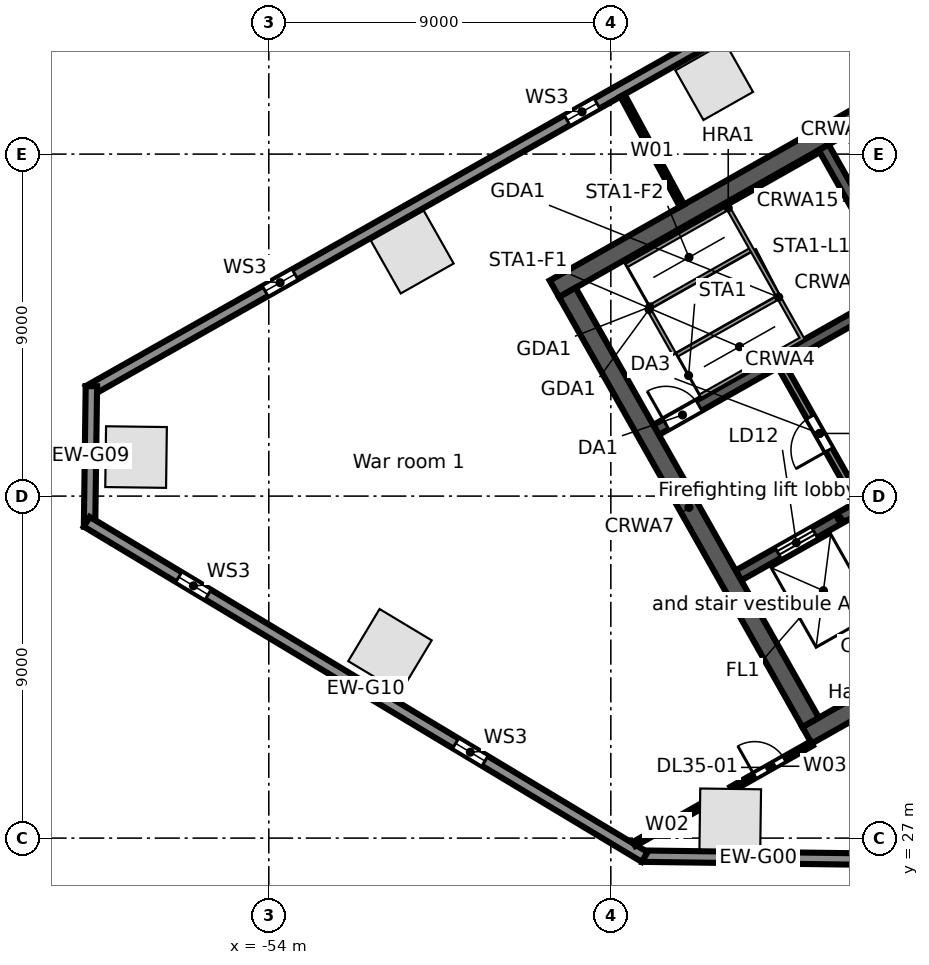
"""IFC4 building model, lengths in metres.
Left out: names, types, materials, properties, quantities, classifications, styles, units other than length and angle.
Written with IfcOpenShell. Run it as: python <this file> out.ifc"""

import sys

from ifc_helpers import new_model, si_unit, direction, frame, frame_2d, origin, origin_2d, place, context, subcontext, project, spatial, rectangle, extrude, element, fill, save


model = new_model("IFC4")
c1 = context("Model", 3, precision=1e-05, world=origin(), true_north=direction((0.0, 1.0)))
c2 = subcontext(c1, "Body", "Model", "MODEL_VIEW")
j1 = project(units=[si_unit("LENGTHUNIT", "METRE"), si_unit("PLANEANGLEUNIT", "RADIAN")], contexts=[c1])
p1 = place(None, origin())
s1 = spatial("IfcSite", under=j1, at=p1, CompositionType="ELEMENT")
p2 = place(p1, origin())
s2 = spatial("IfcBuilding", under=s1, at=p2, CompositionType="ELEMENT")
p3 = place(p2, frame((0.0, 0.0, 174.9)))
s3 = spatial("IfcBuildingStorey", under=s2, at=p3, CompositionType="ELEMENT", Elevation=174.9)
p4 = place(p3, frame((-42.28, 46.919, 0.0), z_axis=(0.0, 0.0, 1.0), x_axis=(-0.87035569594, -0.492423560103, 0.0)))
e1 = element("IfcColumn", 1, at=p4, inside=s3, PredefinedType="COLUMN", context=c2, shape_type="SweptSolid", body=[
    extrude(rectangle(XDim=1.5, YDim=1.5, at=origin_2d()), origin(), (0.0, 0.0, 1.0), 4.0),
])
for number, where, z_axis, x_axis in (
    (2, (-50.226, 42.423, 0.0), (0.0, 0.0, 1.0), (-0.87, -0.492, 0.0)),
    (3, (-57.493, 37.027, 0.0), (0.0, 0.0, 1.0), (-0.013, -1.0, 0.0)),
    (4, (-50.812, 31.931, 0.0), (0.0, 0.0, 1.0), (0.857, -0.515, 0.0)),
    (5, (-41.858, 27.495, 0.0), (0.0, 0.0, 1.0), (1.0, -0.013, 0.0)),
):
    element("IfcColumn", number, at=place(p3, frame(where, z_axis=z_axis, x_axis=x_axis)), inside=s3, PredefinedType="COLUMN", context=c2, shape_type="SweptSolid", body=[
        extrude(rectangle(XDim=1.6, YDim=1.6, at=origin_2d()), origin(), (0.0, 0.0, 1.0), 4.0),
    ])
p5 = place(p3, frame((-38.057, 26.445, 0.0), z_axis=(0.0, 0.0, 1.0), x_axis=(-0.999914086342, 0.013108010296, 0.0)))
e6 = element("IfcWall", 6, at=p5, inside=s3, PredefinedType="STANDARD", context=c2, shape_type="SweptSolid", body=[
    extrude(rectangle(XDim=6.128, YDim=0.3, at=frame_2d((3.064, 0.0))), origin(), (0.0, 0.0, 1.0), 3.68),
])
p6 = place(p3, frame((-58.745, 38.764, 0.0), z_axis=(0.0, 0.0, 1.0), x_axis=(0.870355811726, 0.492423355453, 0.0)))
e7 = element("IfcWall", 7, at=p6, inside=s3, PredefinedType="STANDARD", context=c2, shape_type="SweptSolid", body=[
    extrude(rectangle(XDim=64.025, YDim=0.3, at=frame_2d((32.013, 0.0))), origin(), (0.0, 0.0, 1.0), 3.68),
])
p7 = place(p6, frame((60.122, 0.0, 0.6)))
e8 = element("IfcOpeningElement", 8, at=p7, cuts=e7, PredefinedType="OPENING", context=c2, shape_type="SweptSolid", body=[
    extrude(rectangle(XDim=0.9, YDim=2.4, at=frame_2d((0.45, 1.2))), frame((0.0, 0.16, 0.0), z_axis=(0.0, -1.0, 0.0), x_axis=(1.0, 0.0, 0.0)), (0.0, 0.0, 1.0), 0.32),
])
p8 = place(p6, frame((50.992, 0.0, 0.6)))
e9 = element("IfcOpeningElement", 9, at=p8, cuts=e7, PredefinedType="OPENING", context=c2, shape_type="SweptSolid", body=[
    extrude(rectangle(XDim=0.9, YDim=2.4, at=frame_2d((0.45, 1.2))), frame((0.0, 0.16, 0.0), z_axis=(0.0, -1.0, 0.0), x_axis=(1.0, 0.0, 0.0)), (0.0, 0.0, 1.0), 0.32),
])
p9 = place(p6, frame((41.862, 0.0, 0.6)))
e10 = element("IfcOpeningElement", 10, at=p9, cuts=e7, PredefinedType="OPENING", context=c2, shape_type="SweptSolid", body=[
    extrude(rectangle(XDim=0.9, YDim=2.4, at=frame_2d((0.45, 1.2))), frame((0.0, 0.16, 0.0), z_axis=(0.0, -1.0, 0.0), x_axis=(1.0, 0.0, 0.0)), (0.0, 0.0, 1.0), 0.32),
])
p10 = place(p6, frame((32.732, 0.0, 0.6)))
e11 = element("IfcOpeningElement", 11, at=p10, cuts=e7, PredefinedType="OPENING", context=c2, shape_type="SweptSolid", body=[
    extrude(rectangle(XDim=0.9, YDim=2.4, at=frame_2d((0.45, 1.2))), frame((0.0, 0.16, 0.0), z_axis=(0.0, -1.0, 0.0), x_axis=(1.0, 0.0, 0.0)), (0.0, 0.0, 1.0), 0.32),
])
p11 = place(p6, frame((23.602, 0.0, 0.6)))
e12 = element("IfcOpeningElement", 12, at=p11, cuts=e7, PredefinedType="OPENING", context=c2, shape_type="SweptSolid", body=[
    extrude(rectangle(XDim=0.9, YDim=2.4, at=frame_2d((0.45, 1.2))), frame((0.0, 0.16, 0.0), z_axis=(0.0, -1.0, 0.0), x_axis=(1.0, 0.0, 0.0)), (0.0, 0.0, 1.0), 0.32),
])
p12 = place(p6, frame((14.472, 0.0, 0.6)))
e13 = element("IfcOpeningElement", 13, at=p12, cuts=e7, PredefinedType="OPENING", context=c2, shape_type="SweptSolid", body=[
    extrude(rectangle(XDim=0.9, YDim=2.4, at=frame_2d((0.45, 1.2))), frame((0.0, 0.16, 0.0), z_axis=(0.0, -1.0, 0.0), x_axis=(1.0, 0.0, 0.0)), (0.0, 0.0, 1.0), 0.32),
])
p13 = place(p6, frame((5.342, 0.0, 0.6)))
e14 = element("IfcOpeningElement", 14, at=p13, cuts=e7, PredefinedType="OPENING", context=c2, shape_type="SweptSolid", body=[
    extrude(rectangle(XDim=0.9, YDim=2.4, at=frame_2d((0.45, 1.2))), frame((0.0, 0.16, 0.0), z_axis=(0.0, -1.0, 0.0), x_axis=(1.0, 0.0, 0.0)), (0.0, 0.0, 1.0), 0.32),
])
p14 = place(p3, frame((-58.717, 35.194, 0.0), z_axis=(0.0, 0.0, 1.0), x_axis=(0.013069053407, 0.999914596275, 0.0)))
e15 = element("IfcWall", 15, at=p14, inside=s3, PredefinedType="STANDARD", context=c2, shape_type="SweptSolid", body=[
    extrude(rectangle(XDim=3.699, YDim=0.3, at=frame_2d((1.849, 0.0))), origin(), (0.0, 0.0, 1.0), 3.68),
])
p15 = place(p3, frame((-44.109, 26.504, 0.0), z_axis=(0.0, 0.0, 1.0), x_axis=(-0.857169502585, 0.515034410344, 0.0)))
e16 = element("IfcWall", 16, at=p15, inside=s3, PredefinedType="STANDARD", context=c2, shape_type="SweptSolid", body=[
    extrude(rectangle(XDim=17.127, YDim=0.3, at=frame_2d((8.563, 0.0))), origin(), (0.0, 0.0, 1.0), 3.68),
])
p16 = place(p15, frame((13.403, 0.0, 0.6)))
e17 = element("IfcOpeningElement", 17, at=p16, cuts=e16, PredefinedType="OPENING", context=c2, shape_type="SweptSolid", body=[
    extrude(rectangle(XDim=0.9, YDim=2.4, at=frame_2d((0.45, 1.2))), frame((0.0, 0.16, 0.0), z_axis=(0.0, -1.0, 0.0), x_axis=(1.0, 0.0, 0.0)), (0.0, 0.0, 1.0), 0.32),
])
p17 = place(p15, frame((4.903, 0.0, 0.6)))
e18 = element("IfcOpeningElement", 18, at=p17, cuts=e16, PredefinedType="OPENING", context=c2, shape_type="SweptSolid", body=[
    extrude(rectangle(XDim=0.9, YDim=2.4, at=frame_2d((0.45, 1.2))), frame((0.0, 0.16, 0.0), z_axis=(0.0, -1.0, 0.0), x_axis=(1.0, 0.0, 0.0)), (0.0, 0.0, 1.0), 0.32),
])
p18 = place(p3, frame((-39.838, 29.705, 0.0), z_axis=(0.0, 0.0, 1.0), x_axis=(0.870350116061, 0.492433422375, 0.0)))
e19 = element("IfcWall", 19, at=p18, inside=s3, PredefinedType="SOLIDWALL", context=c2, shape_type="SweptSolid", body=[
    extrude(rectangle(XDim=17.0, YDim=0.5, at=frame_2d((8.5, 0.0))), origin(), (0.0, 0.0, 1.0), 3.68),
])
p19 = place(p18, frame((7.2, 0.0, 0.0)))
e20 = element("IfcOpeningElement", 20, at=p19, cuts=e19, PredefinedType="OPENING", context=c2, shape_type="SweptSolid", body=[
    extrude(rectangle(XDim=1.2, YDim=2.1, at=frame_2d((0.6, 1.05))), frame((0.0, 0.26, 0.0), z_axis=(0.0, -1.0, 0.0), x_axis=(1.0, 0.0, 0.0)), (0.0, 0.0, 1.0), 0.52),
])
p20 = place(p3, frame((-41.643, 33.912, 0.0), z_axis=(0.0, 0.0, 1.0), x_axis=(0.870343599782, 0.492444939378, 0.0)))
e21 = element("IfcWall", 21, at=p20, inside=s3, PredefinedType="SOLIDWALL", context=c2, shape_type="SweptSolid", body=[
    extrude(rectangle(XDim=6.1, YDim=0.3, at=frame_2d((3.05, 0.0))), origin(), (0.0, 0.0, 1.0), 3.68),
])
p21 = place(p20, frame((1.2, 0.0, 0.0)))
e22 = element("IfcOpeningElement", 22, at=p21, cuts=e21, PredefinedType="OPENING", context=c2, shape_type="SweptSolid", body=[
    extrude(rectangle(XDim=1.1, YDim=2.1, at=frame_2d((0.55, 1.05))), frame((0.0, 0.16, 0.0), z_axis=(0.0, -1.0, 0.0), x_axis=(1.0, 0.0, 0.0)), (0.0, 0.0, 1.0), 0.32),
])
p22 = place(p20, frame((4.35, 0.0, 0.0)))
e23 = element("IfcOpeningElement", 23, at=p22, cuts=e21, PredefinedType="OPENING", context=c2, shape_type="SweptSolid", body=[
    extrude(rectangle(XDim=1.1, YDim=2.1, at=frame_2d((0.55, 1.05))), frame((0.0, 0.16, 0.0), z_axis=(0.0, -1.0, 0.0), x_axis=(1.0, 0.0, 0.0)), (0.0, 0.0, 1.0), 0.32),
])
p23 = place(p3, frame((-43.81, 37.741, 0.0), z_axis=(0.0, 0.0, 1.0), x_axis=(0.870350569555, 0.492432620848, 0.0)))
e24 = element("IfcWall", 24, at=p23, inside=s3, PredefinedType="SOLIDWALL", context=c2, shape_type="SweptSolid", body=[
    extrude(rectangle(XDim=7.5, YDim=0.3, at=frame_2d((3.75, 0.0))), origin(), (0.0, 0.0, 1.0), 3.68),
])
p24 = place(p23, frame((0.3, 0.0, 0.0)))
e25 = element("IfcOpeningElement", 25, at=p24, cuts=e24, PredefinedType="OPENING", context=c2, shape_type="SweptSolid", body=[
    extrude(rectangle(XDim=1.0, YDim=2.1, at=frame_2d((0.5, 1.05))), frame((0.0, 0.16, 0.0), z_axis=(0.0, -1.0, 0.0), x_axis=(1.0, 0.0, 0.0)), (0.0, 0.0, 1.0), 0.32),
])
p25 = place(p3, frame((-46.486, 41.455, 0.0), z_axis=(0.0, 0.0, 1.0), x_axis=(0.870353598469, 0.492427267353, 0.0)))
e26 = element("IfcWall", 26, at=p25, inside=s3, PredefinedType="SOLIDWALL", context=c2, shape_type="SweptSolid", body=[
    extrude(rectangle(XDim=17.0, YDim=0.5, at=frame_2d((8.5, 0.0))), origin(), (0.0, 0.0, 1.0), 3.68),
])
p26 = place(p3, frame((-46.145, 41.361, 0.0), z_axis=(0.0, 0.0, 1.0), x_axis=(0.492435316254, -0.870349044525, 0.0)))
e27 = element("IfcWall", 27, at=p26, inside=s3, PredefinedType="SOLIDWALL", context=c2, shape_type="SweptSolid", body=[
    extrude(rectangle(XDim=13.0, YDim=0.5, at=frame_2d((6.5, 0.0))), origin(), (0.0, 0.0, 1.0), 3.68),
])
p27 = place(p3, frame((-40.516, 39.433, 0.0), z_axis=(0.0, 0.0, 1.0), x_axis=(0.492453559952, -0.87033872216, 0.0)))
e28 = element("IfcWall", 28, at=p27, inside=s3, PredefinedType="PARTITIONING", context=c2, shape_type="SweptSolid", body=[
    extrude(rectangle(XDim=4.1, YDim=0.2, at=frame_2d((2.05, 0.0))), origin(), (0.0, 0.0, 1.0), 3.68),
])
p28 = place(p27, frame((1.55, 0.0, 0.0)))
e29 = element("IfcOpeningElement", 29, at=p28, cuts=e28, PredefinedType="OPENING", context=c2, shape_type="SweptSolid", body=[
    extrude(rectangle(XDim=1.0, YDim=2.1, at=frame_2d((0.5, 1.05))), frame((0.0, 0.11, 0.0), z_axis=(0.0, -1.0, 0.0), x_axis=(1.0, 0.0, 0.0)), (0.0, 0.0, 1.0), 0.22),
])
p29 = place(p3, frame((-39.399, 45.177, 0.0), z_axis=(0.0, 0.0, 1.0), x_axis=(0.492396453737, -0.870371031427, 0.0)))
e30 = element("IfcWall", 30, at=p29, inside=s3, PredefinedType="SOLIDWALL", context=c2, shape_type="SweptSolid", body=[
    extrude(rectangle(XDim=4.15, YDim=0.3, at=frame_2d((2.075, 0.0))), origin(), (0.0, 0.0, 1.0), 3.68),
])
p30 = place(p3, frame((-38.703, 45.571, 0.0), z_axis=(0.0, 0.0, 1.0), x_axis=(0.492396453737, -0.870371031427, 0.0)))
e31 = element("IfcWall", 31, at=p30, inside=s3, PredefinedType="SOLIDWALL", context=c2, shape_type="SweptSolid", body=[
    extrude(rectangle(XDim=4.15, YDim=0.2, at=frame_2d((2.075, 0.0))), origin(), (0.0, 0.0, 1.0), 3.68),
])
p31 = place(p3, frame((-44.693, 46.542, 0.0), z_axis=(0.0, 0.0, 1.0), x_axis=(0.475199384016, -0.879878142376, 0.0)))
e32 = element("IfcWall", 32, at=p31, inside=s3, PredefinedType="PARTITIONING", context=c2, shape_type="SweptSolid", body=[
    extrude(rectangle(XDim=3.296, YDim=0.125, at=frame_2d((1.648, 0.0))), origin(), (0.0, 0.0, 1.0), 2.96),
])
p32 = place(p3, frame((-44.386, 26.845, 0.0), z_axis=(0.0, 0.0, 1.0), x_axis=(0.870453184796, 0.492251209322, 0.0)))
e33 = element("IfcWall", 33, at=p32, inside=s3, PredefinedType="PARTITIONING", context=c2, shape_type="SweptSolid", body=[
    extrude(rectangle(XDim=1.991, YDim=0.125, at=frame_2d((0.995, 0.0))), origin(), (0.0, 0.0, 1.0), 3.68),
])
p33 = place(p3, frame((-41.824, 28.294, 0.0), z_axis=(0.0, 0.0, 1.0), x_axis=(0.870189216305, 0.492717695873, 0.0)))
e34 = element("IfcWall", 34, at=p33, inside=s3, PredefinedType="PARTITIONING", context=c2, shape_type="SweptSolid", body=[
    extrude(rectangle(XDim=2.424, YDim=0.125, at=frame_2d((1.212, 0.0))), origin(), (0.0, 0.0, 1.0), 3.68),
])
p34 = place(p33, frame((0.7, 0.0, 0.0)))
e35 = element("IfcOpeningElement", 35, at=p34, cuts=e34, PredefinedType="OPENING", context=c2, shape_type="SweptSolid", body=[
    extrude(rectangle(XDim=0.9, YDim=2.1, at=frame_2d((0.45, 1.05))), frame((0.0, 0.073, 0.0), z_axis=(0.0, -1.0, 0.0), x_axis=(1.0, 0.0, 0.0)), (0.0, 0.0, 1.0), 0.145),
])
p35 = place(p12, origin())
e36 = element("IfcWindow", 36, at=p35, inside=s3, PartitioningType="SINGLE_PANEL", PredefinedType="WINDOW", context=c2, shape_type="SweptSolid", body=[
    extrude(rectangle(XDim=0.9, YDim=2.4, at=frame_2d((0.45, 1.2))), frame((0.0, 0.03, 0.0), z_axis=(0.0, -1.0, 0.0), x_axis=(1.0, 0.0, 0.0)), (0.0, 0.0, 1.0), 0.06),
])
fill(e13, e36)
p36 = place(p13, origin())
e37 = element("IfcWindow", 37, at=p36, inside=s3, PartitioningType="SINGLE_PANEL", PredefinedType="WINDOW", context=c2, shape_type="SweptSolid", body=[
    extrude(rectangle(XDim=0.9, YDim=2.4, at=frame_2d((0.45, 1.2))), frame((0.0, 0.03, 0.0), z_axis=(0.0, -1.0, 0.0), x_axis=(1.0, 0.0, 0.0)), (0.0, 0.0, 1.0), 0.06),
])
fill(e14, e37)
p37 = place(p16, origin())
e38 = element("IfcWindow", 38, at=p37, inside=s3, PartitioningType="SINGLE_PANEL", PredefinedType="WINDOW", context=c2, shape_type="SweptSolid", body=[
    extrude(rectangle(XDim=0.9, YDim=2.4, at=frame_2d((0.45, 1.2))), frame((0.0, 0.03, 0.0), z_axis=(0.0, -1.0, 0.0), x_axis=(1.0, 0.0, 0.0)), (0.0, 0.0, 1.0), 0.06),
])
fill(e17, e38)
p38 = place(p17, origin())
e39 = element("IfcWindow", 39, at=p38, inside=s3, PartitioningType="SINGLE_PANEL", PredefinedType="WINDOW", context=c2, shape_type="SweptSolid", body=[
    extrude(rectangle(XDim=0.9, YDim=2.4, at=frame_2d((0.45, 1.2))), frame((0.0, 0.03, 0.0), z_axis=(0.0, -1.0, 0.0), x_axis=(1.0, 0.0, 0.0)), (0.0, 0.0, 1.0), 0.06),
])
fill(e18, e39)
p39 = place(p21, origin())
e40 = element("IfcDoor", 40, at=p39, inside=s3, OperationType="DOUBLE_DOOR_SLIDING", PredefinedType="DOOR", context=c2, shape_type="SweptSolid", body=[
    extrude(rectangle(XDim=1.1, YDim=2.1, at=frame_2d((0.55, 1.05))), frame((0.0, 0.025, 0.0), z_axis=(0.0, -1.0, 0.0), x_axis=(1.0, 0.0, 0.0)), (0.0, 0.0, 1.0), 0.05),
])
fill(e22, e40)
p40 = place(p24, origin())
e41 = element("IfcDoor", 41, at=p40, inside=s3, OperationType="SINGLE_SWING_LEFT", PredefinedType="DOOR", context=c2, shape_type="SweptSolid", body=[
    extrude(rectangle(XDim=1.0, YDim=2.1, at=frame_2d((0.5, 1.05))), frame((0.0, 0.025, 0.0), z_axis=(0.0, -1.0, 0.0), x_axis=(1.0, 0.0, 0.0)), (0.0, 0.0, 1.0), 0.05),
])
fill(e25, e41)
p41 = place(p28, frame((1.0, 0.0, 0.0), z_axis=(0.0, 0.0, 1.0), x_axis=(-1.0, 0.0, 0.0)))
e42 = element("IfcDoor", 42, at=p41, inside=s3, OperationType="SINGLE_SWING_LEFT", PredefinedType="DOOR", context=c2, shape_type="SweptSolid", body=[
    extrude(rectangle(XDim=1.0, YDim=2.1, at=frame_2d((0.5, 1.05))), frame((0.0, 0.025, 0.0), z_axis=(0.0, -1.0, 0.0), x_axis=(1.0, 0.0, 0.0)), (0.0, 0.0, 1.0), 0.05),
])
fill(e29, e42)
p42 = place(p34, origin())
e43 = element("IfcDoor", 43, at=p42, inside=s3, OperationType="SINGLE_SWING_LEFT", PredefinedType="DOOR", context=c2, shape_type="SweptSolid", body=[
    extrude(rectangle(XDim=0.9, YDim=2.1, at=frame_2d((0.45, 1.05))), frame((0.0, 0.025, 0.0), z_axis=(0.0, -1.0, 0.0), x_axis=(1.0, 0.0, 0.0)), (0.0, 0.0, 1.0), 0.05),
])
fill(e35, e43)
save(model, sys.argv[1])
